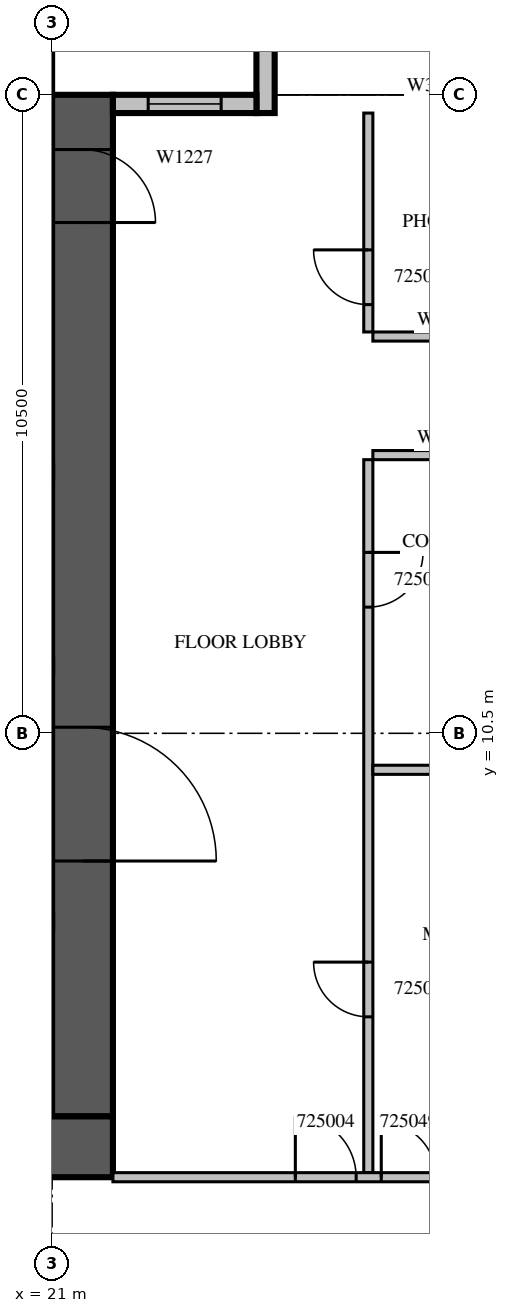
"""IFC4 building model, lengths in metres.
Left out: names, types, materials, properties, quantities, classifications, styles, units other than length and angle.
Written with IfcOpenShell. Run it as: python <this file> out.ifc"""

import sys

from ifc_helpers import new_model, si_unit, direction, frame, frame_2d, origin, place, context, subcontext, project, spatial, rectangle, extrude, source, transform, mapped, element, fill, save


model = new_model("IFC4")
c1 = context("Model", 3, precision=1e-05, world=origin(), true_north=direction((0.0, 1.0)))
c2 = subcontext(c1, "Body", "Model", "MODEL_VIEW")
j1 = project(units=[si_unit("LENGTHUNIT", "METRE"), si_unit("PLANEANGLEUNIT", "RADIAN")], contexts=[c1])
p1 = place(None, origin())
s1 = spatial("IfcSite", under=j1, at=p1, CompositionType="ELEMENT")
p2 = place(p1, origin())
s2 = spatial("IfcBuilding", under=s1, at=p2, CompositionType="ELEMENT")
p3 = place(p2, frame((0.0, 0.0, 116.1)))
s3 = spatial("IfcBuildingStorey", under=s2, at=p3, CompositionType="ELEMENT", Elevation=116.1)
m1 = source(origin(), c2, "Body", "SweptSolid", [
    extrude(rectangle(XDim=16.8, YDim=1.0, at=frame_2d((8.4, 0.0))), origin(), (0.0, 0.0, 1.0), 4.2),
])
p4 = place(p3, frame((21.5, 4.2, 0.0), z_axis=(0.0, 0.0, 1.0), x_axis=(0.0, 1.0, 0.0)))
e1 = element("IfcWall", 1, at=p4, inside=s3, PredefinedType="SHEAR", context=c2, shape_type="MappedRepresentation", body=[
    mapped(m1, transform((0.0, 0.0, 0.0), scale=1.0)),
])
m2 = source(origin(), c2, "Body", "SweptSolid", [
    extrude(rectangle(XDim=2.2, YDim=2.1, at=frame_2d((1.1, 1.05))), frame((0.0, 0.51, 0.0), z_axis=(0.0, -1.0, 0.0), x_axis=(1.0, 0.0, 0.0)), (0.0, 0.0, 1.0), 1.02),
])
p5 = place(p4, frame((4.2, 0.0, 0.0)))
e2 = element("IfcOpeningElement", 2, at=p5, cuts=e1, PredefinedType="OPENING", context=c2, shape_type="MappedRepresentation", body=[
    mapped(m2, transform((0.0, 0.0, 0.0), scale=1.0)),
])
m3 = source(origin(), c2, "Body", "SweptSolid", [
    extrude(rectangle(XDim=1.2, YDim=2.1, at=frame_2d((0.6, 1.05))), frame((0.0, 0.51, 0.0), z_axis=(0.0, -1.0, 0.0), x_axis=(1.0, 0.0, 0.0)), (0.0, 0.0, 1.0), 1.02),
])
p6 = place(p4, frame((14.7, 0.0, 0.0)))
e3 = element("IfcOpeningElement", 3, at=p6, cuts=e1, PredefinedType="OPENING", context=c2, shape_type="MappedRepresentation", body=[
    mapped(m3, transform((0.0, 0.0, 0.0), scale=1.0)),
])
m4 = source(origin(), c2, "Body", "SweptSolid", [
    extrude(rectangle(XDim=17.8, YDim=1.0, at=frame_2d((8.9, 0.0))), origin(), (0.0, 0.0, 1.0), 4.2),
])
p7 = place(p3, frame((4.2, 3.7, 0.0), z_axis=(0.0, 0.0, 1.0), x_axis=(1.0, 0.0, 0.0)))
e4 = element("IfcWall", 4, at=p7, inside=s3, PredefinedType="SHEAR", context=c2, shape_type="MappedRepresentation", body=[
    mapped(m4, transform((0.0, 0.0, 0.0), scale=1.0)),
])
m5 = source(origin(), c2, "Body", "SweptSolid", [
    extrude(rectangle(XDim=1.2, YDim=0.3, at=frame_2d((0.6, 0.0))), origin(), (0.0, 0.0, 1.0), 3.8),
])
p8 = place(p3, frame((24.51, 20.7, 0.0), z_axis=(0.0, 0.0, 1.0), x_axis=(0.0, 1.0, 0.0)))
e5 = element("IfcWall", 5, at=p8, inside=s3, PredefinedType="STANDARD", context=c2, shape_type="MappedRepresentation", body=[
    mapped(m5, transform((0.0, 0.0, 0.0), scale=1.0)),
])
p9 = place(p3, frame((24.36, 20.85, 0.0), z_axis=(0.0, 0.0, 1.0), x_axis=(-1.0, 0.0, 0.0)))
e6 = element("IfcWall", 6, at=p9, inside=s3, PredefinedType="STANDARD", context=c2, shape_type="SweptSolid", body=[
    extrude(rectangle(XDim=2.36, YDim=0.3, at=frame_2d((1.18, 0.0))), origin(), (0.0, 0.0, 1.0), 3.8),
])
m6 = source(origin(), c2, "Body", "SweptSolid", [
    extrude(rectangle(XDim=1.2, YDim=2.7, at=frame_2d((0.6, 1.35))), frame((0.0, 0.16, 0.0), z_axis=(0.0, -1.0, 0.0), x_axis=(1.0, 0.0, 0.0)), (0.0, 0.0, 1.0), 0.32),
])
p10 = place(p9, frame((0.58, 0.0, 0.6)))
e7 = element("IfcOpeningElement", 7, at=p10, cuts=e6, PredefinedType="OPENING", context=c2, shape_type="MappedRepresentation", body=[
    mapped(m6, transform((0.0, 0.0, 0.0), scale=1.0)),
])
p11 = place(p3, frame((26.2, 15.0, 0.0), z_axis=(0.0, 0.0, 1.0), x_axis=(0.0, -1.0, 0.0)))
e8 = element("IfcWall", 8, at=p11, inside=s3, PredefinedType="PARTITIONING", context=c2, shape_type="SweptSolid", body=[
    extrude(rectangle(XDim=11.725, YDim=0.15, at=frame_2d((5.862, 0.0))), origin(), (0.0, 0.0, 1.0), 3.8),
])
m7 = source(origin(), c2, "Body", "SweptSolid", [
    extrude(rectangle(XDim=0.9, YDim=2.1, at=frame_2d((0.45, 1.05))), frame((0.0, 0.085, 0.0), z_axis=(0.0, -1.0, 0.0), x_axis=(1.0, 0.0, 0.0)), (0.0, 0.0, 1.0), 0.17),
])
p12 = place(p11, frame((8.262, 0.0, 0.0)))
e9 = element("IfcOpeningElement", 9, at=p12, cuts=e8, PredefinedType="OPENING", context=c2, shape_type="MappedRepresentation", body=[
    mapped(m7, transform((0.0, 0.0, 0.0), scale=1.0)),
])
p13 = place(p11, frame((1.525, 0.0, 0.0)))
e10 = element("IfcOpeningElement", 10, at=p13, cuts=e8, PredefinedType="OPENING", context=c2, shape_type="MappedRepresentation", body=[
    mapped(m7, transform((0.0, 0.0, 0.0), scale=1.0)),
])
m8 = source(origin(), c2, "Body", "SweptSolid", [
    extrude(rectangle(XDim=3.6, YDim=0.15, at=frame_2d((1.8, 0.0))), origin(), (0.0, 0.0, 1.0), 3.8),
])
p14 = place(p3, frame((26.2, 20.7, 0.0), z_axis=(0.0, 0.0, 1.0), x_axis=(0.0, -1.0, 0.0)))
e11 = element("IfcWall", 11, at=p14, inside=s3, PredefinedType="PARTITIONING", context=c2, shape_type="MappedRepresentation", body=[
    mapped(m8, transform((0.0, 0.0, 0.0), scale=1.0)),
])
p15 = place(p14, frame((2.25, 0.0, 0.0)))
e12 = element("IfcOpeningElement", 12, at=p15, cuts=e11, PredefinedType="OPENING", context=c2, shape_type="MappedRepresentation", body=[
    mapped(m7, transform((0.0, 0.0, 0.0), scale=1.0)),
])
p16 = place(p3, frame((29.325, 9.9, 0.0), z_axis=(0.0, 0.0, 1.0), x_axis=(-1.0, 0.0, 0.0)))
e13 = element("IfcWall", 13, at=p16, inside=s3, PredefinedType="PARTITIONING", context=c2, shape_type="SweptSolid", body=[
    extrude(rectangle(XDim=3.05, YDim=0.15, at=frame_2d((1.525, 0.0))), origin(), (0.0, 0.0, 1.0), 3.8),
])
m9 = source(origin(), c2, "Body", "SweptSolid", [
    extrude(rectangle(XDim=3.05, YDim=0.15, at=frame_2d((1.525, 0.0))), origin(), (0.0, 0.0, 1.0), 3.8),
])
for number, where, z_axis, x_axis in (
    (14, (29.325, 15.075, 0.0), (0.0, 0.0, 1.0), (-1.0, 0.0, 0.0)),
    (15, (26.275, 17.025, 0.0), (0.0, 0.0, 1.0), (1.0, 0.0, 0.0)),
):
    element("IfcWall", number, at=place(p3, frame(where, z_axis=z_axis, x_axis=x_axis)), inside=s3, PredefinedType="PARTITIONING", context=c2, shape_type="MappedRepresentation", body=[
        mapped(m9, transform((0.0, 0.0, 0.0), scale=1.0)),
    ])
m10 = source(origin(), c2, "Body", "SweptSolid", [
    extrude(rectangle(XDim=7.325, YDim=0.15, at=frame_2d((3.663, 0.0))), origin(), (0.0, 0.0, 1.0), 3.8),
])
p17 = place(p3, frame((22.0, 3.2, 0.0), z_axis=(0.0, 0.0, 1.0), x_axis=(1.0, 0.0, 0.0)))
e16 = element("IfcWall", 16, at=p17, inside=s3, PredefinedType="PARTITIONING", context=c2, shape_type="MappedRepresentation", body=[
    mapped(m10, transform((0.0, 0.0, 0.0), scale=1.0)),
])
m11 = source(origin(), c2, "Body", "SweptSolid", [
    extrude(rectangle(XDim=1.0, YDim=2.1, at=frame_2d((0.5, 1.05))), frame((0.0, 0.085, 0.0), z_axis=(0.0, -1.0, 0.0), x_axis=(1.0, 0.0, 0.0)), (0.0, 0.0, 1.0), 0.17),
])
p18 = place(p17, frame((3.0, 0.0, 0.0)))
e17 = element("IfcOpeningElement", 17, at=p18, cuts=e16, PredefinedType="OPENING", context=c2, shape_type="MappedRepresentation", body=[
    mapped(m11, transform((0.0, 0.0, 0.0), scale=1.0)),
])
p19 = place(p17, frame((4.413, 0.0, 0.0)))
e18 = element("IfcOpeningElement", 18, at=p19, cuts=e16, PredefinedType="OPENING", context=c2, shape_type="MappedRepresentation", body=[
    mapped(m7, transform((0.0, 0.0, 0.0), scale=1.0)),
])
m12 = source(origin(), c2, "Body", "SweptSolid", [
    extrude(rectangle(XDim=1.2, YDim=2.7, at=frame_2d((0.6, 1.35))), frame((0.0, 0.03, 0.0), z_axis=(0.0, -1.0, 0.0), x_axis=(1.0, 0.0, 0.0)), (0.0, 0.0, 1.0), 0.06),
])
p20 = place(p10, origin())
e19 = element("IfcWindow", 19, at=p20, inside=s3, PartitioningType="SINGLE_PANEL", PredefinedType="WINDOW", context=c2, shape_type="MappedRepresentation", body=[
    mapped(m12, transform((0.0, 0.0, 0.0), scale=1.0)),
])
fill(e7, e19)
m13 = source(origin(), c2, "Body", "SweptSolid", [
    extrude(rectangle(XDim=2.2, YDim=2.1, at=frame_2d((1.1, 1.05))), frame((0.0, 0.025, 0.0), z_axis=(0.0, -1.0, 0.0), x_axis=(1.0, 0.0, 0.0)), (0.0, 0.0, 1.0), 0.05),
])
p21 = place(p5, origin())
e20 = element("IfcDoor", 20, at=p21, inside=s3, OperationType="DOUBLE_DOOR_SINGLE_SWING", PredefinedType="DOOR", context=c2, shape_type="MappedRepresentation", body=[
    mapped(m13, transform((0.0, 0.0, 0.0), scale=1.0)),
])
fill(e2, e20)
m14 = source(origin(), c2, "Body", "SweptSolid", [
    extrude(rectangle(XDim=1.2, YDim=2.1, at=frame_2d((0.6, 1.05))), frame((0.0, 0.025, 0.0), z_axis=(0.0, -1.0, 0.0), x_axis=(1.0, 0.0, 0.0)), (0.0, 0.0, 1.0), 0.05),
])
p22 = place(p6, origin())
e21 = element("IfcDoor", 21, at=p22, inside=s3, OperationType="SINGLE_SWING_RIGHT", PredefinedType="DOOR", context=c2, shape_type="MappedRepresentation", body=[
    mapped(m14, transform((0.0, 0.0, 0.0), scale=1.0)),
])
fill(e3, e21)
m15 = source(origin(), c2, "Body", "SweptSolid", [
    extrude(rectangle(XDim=0.9, YDim=2.1, at=frame_2d((0.45, 1.05))), frame((0.0, 0.025, 0.0), z_axis=(0.0, -1.0, 0.0), x_axis=(1.0, 0.0, 0.0)), (0.0, 0.0, 1.0), 0.05),
])
p23 = place(p12, origin())
e22 = element("IfcDoor", 22, at=p23, inside=s3, OperationType="SINGLE_SWING_RIGHT", PredefinedType="DOOR", context=c2, shape_type="MappedRepresentation", body=[
    mapped(m15, transform((0.0, 0.0, 0.0), scale=1.0)),
])
fill(e9, e22)
p24 = place(p13, origin())
e23 = element("IfcDoor", 23, at=p24, inside=s3, OperationType="SINGLE_SWING_LEFT", PredefinedType="DOOR", context=c2, shape_type="MappedRepresentation", body=[
    mapped(m15, transform((0.0, 0.0, 0.0), scale=1.0)),
])
fill(e10, e23)
p25 = place(p15, origin())
e24 = element("IfcDoor", 24, at=p25, inside=s3, OperationType="SINGLE_SWING_RIGHT", PredefinedType="DOOR", context=c2, shape_type="MappedRepresentation", body=[
    mapped(m15, transform((0.0, 0.0, 0.0), scale=1.0)),
])
fill(e12, e24)
m16 = source(origin(), c2, "Body", "SweptSolid", [
    extrude(rectangle(XDim=1.0, YDim=2.1, at=frame_2d((0.5, 1.05))), frame((0.0, 0.025, 0.0), z_axis=(0.0, -1.0, 0.0), x_axis=(1.0, 0.0, 0.0)), (0.0, 0.0, 1.0), 0.05),
])
p26 = place(p18, origin())
e25 = element("IfcDoor", 25, at=p26, inside=s3, OperationType="SINGLE_SWING_LEFT", PredefinedType="DOOR", context=c2, shape_type="MappedRepresentation", body=[
    mapped(m16, transform((0.0, 0.0, 0.0), scale=1.0)),
])
fill(e17, e25)
p27 = place(p19, origin())
e26 = element("IfcDoor", 26, at=p27, inside=s3, OperationType="SINGLE_SWING_LEFT", PredefinedType="DOOR", context=c2, shape_type="MappedRepresentation", body=[
    mapped(m15, transform((0.0, 0.0, 0.0), scale=1.0)),
])
fill(e18, e26)
save(model, sys.argv[1])
